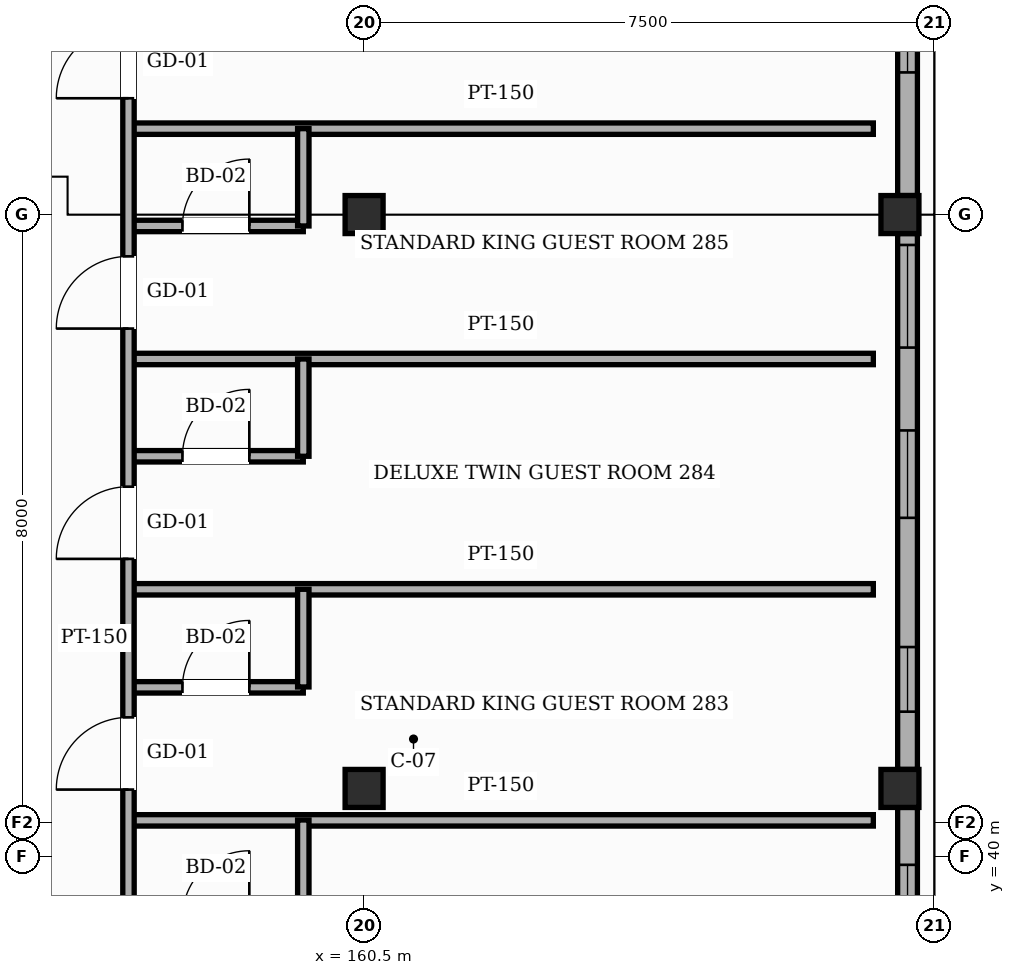
"""IFC4 building model, lengths in metres.
Left out: names, types, materials, properties, quantities, classifications, styles, units other than length and angle.
Written with IfcOpenShell. Run it as: python <this file> out.ifc"""

import sys

from ifc_helpers import new_model, si_unit, direction, frame, frame_2d, origin, origin_2d, place, context, subcontext, project, spatial, rectangle, hollow_rectangle, extrude, element, fill, save


model = new_model("IFC4")
c1 = context("Model", 3, precision=1e-05, world=origin(), true_north=direction((0.0, 1.0)))
c2 = subcontext(c1, "Body", "Model", "MODEL_VIEW")
j1 = project(units=[si_unit("LENGTHUNIT", "METRE"), si_unit("PLANEANGLEUNIT", "RADIAN")], contexts=[c1])
p1 = place(None, origin())
s1 = spatial("IfcSite", under=j1, at=p1, CompositionType="ELEMENT")
p2 = place(p1, origin())
s2 = spatial("IfcBuilding", under=s1, at=p2, CompositionType="ELEMENT")
p3 = place(p2, frame((0.0, 0.0, 39.0)))
s3 = spatial("IfcBuildingStorey", under=s2, at=p3, CompositionType="ELEMENT", Elevation=39.0)
for number, where, z_axis, x_axis in (
    (1, (160.5, 40.9, 0.0), (0.0, 0.0, 1.0), (1.0, 0.0, 0.0)),
    (2, (160.5, 48.45, 0.0), (0.0, 0.0, 1.0), (1.0, 0.0, 0.0)),
    (3, (167.55, 40.9, 0.0), (0.0, 0.0, 1.0), (1.0, 0.0, 0.0)),
    (4, (167.55, 48.45, 0.0), (0.0, 0.0, 1.0), (1.0, 0.0, 0.0)),
):
    element("IfcColumn", number, at=place(p3, frame(where, z_axis=z_axis, x_axis=x_axis)), inside=s3, PredefinedType="COLUMN", context=c2, shape_type="SweptSolid", body=[
        extrude(hollow_rectangle(XDim=0.5, YDim=0.5, WallThickness=0.022, InnerFilletRadius=0.022, OuterFilletRadius=0.044, at=origin_2d()), origin(), (0.0, 0.0, 1.0), 3.6),
    ])
p4 = place(p3, frame((167.65, 40.65, 0.0), z_axis=(0.0, 0.0, 1.0), x_axis=(0.0, -1.0, 0.0)))
e5 = element("IfcWall", 5, at=p4, inside=s3, PredefinedType="SOLIDWALL", context=c2, shape_type="SweptSolid", body=[
    extrude(rectangle(XDim=8.4, YDim=0.26, at=frame_2d((4.2, 0.0))), origin(), (0.0, 0.0, 1.0), 2.755),
])
p5 = place(p4, frame((6.59, 0.0, 0.85)))
e6 = element("IfcOpeningElement", 6, at=p5, cuts=e5, PredefinedType="OPENING", context=c2, shape_type="SweptSolid", body=[
    extrude(rectangle(XDim=1.45, YDim=1.35, at=frame_2d((0.725, 0.675))), frame((0.0, 0.14, 0.0), z_axis=(0.0, -1.0, 0.0), x_axis=(1.0, 0.0, 0.0)), (0.0, 0.0, 1.0), 0.28),
])
p6 = place(p4, frame((3.885, 0.0, 0.85)))
e7 = element("IfcOpeningElement", 7, at=p6, cuts=e5, PredefinedType="OPENING", context=c2, shape_type="SweptSolid", body=[
    extrude(rectangle(XDim=1.65, YDim=1.35, at=frame_2d((0.825, 0.675))), frame((0.0, 0.14, 0.0), z_axis=(0.0, -1.0, 0.0), x_axis=(1.0, 0.0, 0.0)), (0.0, 0.0, 1.0), 0.28),
])
p7 = place(p4, frame((0.755, 0.0, 0.85)))
e8 = element("IfcOpeningElement", 8, at=p7, cuts=e5, PredefinedType="OPENING", context=c2, shape_type="SweptSolid", body=[
    extrude(rectangle(XDim=1.85, YDim=1.35, at=frame_2d((0.925, 0.675))), frame((0.0, 0.14, 0.0), z_axis=(0.0, -1.0, 0.0), x_axis=(1.0, 0.0, 0.0)), (0.0, 0.0, 1.0), 0.28),
])
p8 = place(p3, frame((167.65, 48.2, 0.0), z_axis=(0.0, 0.0, 1.0), x_axis=(0.0, -1.0, 0.0)))
e9 = element("IfcWall", 9, at=p8, inside=s3, PredefinedType="SOLIDWALL", context=c2, shape_type="SweptSolid", body=[
    extrude(rectangle(XDim=7.05, YDim=0.26, at=frame_2d((3.525, 0.0))), origin(), (0.0, 0.0, 1.0), 2.755),
])
p9 = place(p8, frame((5.44, 0.0, 0.85)))
e10 = element("IfcOpeningElement", 10, at=p9, cuts=e9, PredefinedType="OPENING", context=c2, shape_type="SweptSolid", body=[
    extrude(rectangle(XDim=0.85, YDim=1.35, at=frame_2d((0.425, 0.675))), frame((0.0, 0.14, 0.0), z_axis=(0.0, -1.0, 0.0), x_axis=(1.0, 0.0, 0.0)), (0.0, 0.0, 1.0), 0.28),
])
p10 = place(p8, frame((2.59, 0.0, 0.85)))
e11 = element("IfcOpeningElement", 11, at=p10, cuts=e9, PredefinedType="OPENING", context=c2, shape_type="SweptSolid", body=[
    extrude(rectangle(XDim=1.15, YDim=1.35, at=frame_2d((0.575, 0.675))), frame((0.0, 0.14, 0.0), z_axis=(0.0, -1.0, 0.0), x_axis=(1.0, 0.0, 0.0)), (0.0, 0.0, 1.0), 0.28),
])
p11 = place(p8, frame((0.15, 0.0, 0.85)))
e12 = element("IfcOpeningElement", 12, at=p11, cuts=e9, PredefinedType="OPENING", context=c2, shape_type="SweptSolid", body=[
    extrude(rectangle(XDim=1.35, YDim=1.35, at=frame_2d((0.675, 0.675))), frame((0.0, 0.14, 0.0), z_axis=(0.0, -1.0, 0.0), x_axis=(1.0, 0.0, 0.0)), (0.0, 0.0, 1.0), 0.28),
])
p12 = place(p3, frame((167.65, 56.2, 0.0), z_axis=(0.0, 0.0, 1.0), x_axis=(0.0, -1.0, 0.0)))
e13 = element("IfcWall", 13, at=p12, inside=s3, PredefinedType="SOLIDWALL", context=c2, shape_type="SweptSolid", body=[
    extrude(rectangle(XDim=7.5, YDim=0.26, at=frame_2d((3.75, 0.0))), origin(), (0.0, 0.0, 1.0), 2.755),
])
p13 = place(p12, frame((4.33, 0.0, 0.85)))
e14 = element("IfcOpeningElement", 14, at=p13, cuts=e13, PredefinedType="OPENING", context=c2, shape_type="SweptSolid", body=[
    extrude(rectangle(XDim=1.55, YDim=1.35, at=frame_2d((0.775, 0.675))), frame((0.0, 0.14, 0.0), z_axis=(0.0, -1.0, 0.0), x_axis=(1.0, 0.0, 0.0)), (0.0, 0.0, 1.0), 0.28),
])
p14 = place(p12, frame((1.2, 0.0, 0.85)))
e15 = element("IfcOpeningElement", 15, at=p14, cuts=e13, PredefinedType="OPENING", context=c2, shape_type="SweptSolid", body=[
    extrude(rectangle(XDim=1.75, YDim=1.35, at=frame_2d((0.875, 0.675))), frame((0.0, 0.14, 0.0), z_axis=(0.0, -1.0, 0.0), x_axis=(1.0, 0.0, 0.0)), (0.0, 0.0, 1.0), 0.28),
])
p15 = place(p3, frame((157.4, 40.48, 0.0), z_axis=(0.0, 0.0, 1.0), x_axis=(1.0, 0.0, 0.0)))
e16 = element("IfcWall", 16, at=p15, inside=s3, PredefinedType="PARTITIONING", context=c2, shape_type="SweptSolid", body=[
    extrude(rectangle(XDim=9.8, YDim=0.15, at=frame_2d((4.9, 0.0))), origin(), (0.0, 0.0, 1.0), 3.365),
])
p16 = place(p3, frame((157.4, 42.23, 0.0), z_axis=(0.0, 0.0, 1.0), x_axis=(1.0, 0.0, 0.0)))
e17 = element("IfcWall", 17, at=p16, inside=s3, PredefinedType="PARTITIONING", context=c2, shape_type="SweptSolid", body=[
    extrude(rectangle(XDim=2.3, YDim=0.15, at=frame_2d((1.15, 0.0))), origin(), (0.0, 0.0, 1.0), 3.365),
])
p17 = place(p16, frame((0.71, 0.0, 0.0)))
e18 = element("IfcOpeningElement", 18, at=p17, cuts=e17, PredefinedType="OPENING", context=c2, shape_type="SweptSolid", body=[
    extrude(rectangle(XDim=0.88, YDim=2.12, at=frame_2d((0.44, 1.06))), frame((0.0, 0.085, 0.0), z_axis=(0.0, -1.0, 0.0), x_axis=(1.0, 0.0, 0.0)), (0.0, 0.0, 1.0), 0.17),
])
p18 = place(p3, frame((157.4, 43.52, 0.0), z_axis=(0.0, 0.0, 1.0), x_axis=(1.0, 0.0, 0.0)))
e19 = element("IfcWall", 19, at=p18, inside=s3, PredefinedType="PARTITIONING", context=c2, shape_type="SweptSolid", body=[
    extrude(rectangle(XDim=9.8, YDim=0.15, at=frame_2d((4.9, 0.0))), origin(), (0.0, 0.0, 1.0), 3.365),
])
p19 = place(p3, frame((157.4, 45.27, 0.0), z_axis=(0.0, 0.0, 1.0), x_axis=(1.0, 0.0, 0.0)))
e20 = element("IfcWall", 20, at=p19, inside=s3, PredefinedType="PARTITIONING", context=c2, shape_type="SweptSolid", body=[
    extrude(rectangle(XDim=2.3, YDim=0.15, at=frame_2d((1.15, 0.0))), origin(), (0.0, 0.0, 1.0), 3.365),
])
p20 = place(p19, frame((0.71, 0.0, 0.0)))
e21 = element("IfcOpeningElement", 21, at=p20, cuts=e20, PredefinedType="OPENING", context=c2, shape_type="SweptSolid", body=[
    extrude(rectangle(XDim=0.88, YDim=2.12, at=frame_2d((0.44, 1.06))), frame((0.0, 0.085, 0.0), z_axis=(0.0, -1.0, 0.0), x_axis=(1.0, 0.0, 0.0)), (0.0, 0.0, 1.0), 0.17),
])
p21 = place(p3, frame((157.4, 46.55, 0.0), z_axis=(0.0, 0.0, 1.0), x_axis=(1.0, 0.0, 0.0)))
e22 = element("IfcWall", 22, at=p21, inside=s3, PredefinedType="PARTITIONING", context=c2, shape_type="SweptSolid", body=[
    extrude(rectangle(XDim=9.8, YDim=0.15, at=frame_2d((4.9, 0.0))), origin(), (0.0, 0.0, 1.0), 3.365),
])
p22 = place(p3, frame((157.4, 48.3, 0.0), z_axis=(0.0, 0.0, 1.0), x_axis=(1.0, 0.0, 0.0)))
e23 = element("IfcWall", 23, at=p22, inside=s3, PredefinedType="PARTITIONING", context=c2, shape_type="SweptSolid", body=[
    extrude(rectangle(XDim=2.3, YDim=0.15, at=frame_2d((1.15, 0.0))), origin(), (0.0, 0.0, 1.0), 3.365),
])
p23 = place(p22, frame((0.71, 0.0, 0.0)))
e24 = element("IfcOpeningElement", 24, at=p23, cuts=e23, PredefinedType="OPENING", context=c2, shape_type="SweptSolid", body=[
    extrude(rectangle(XDim=0.88, YDim=2.12, at=frame_2d((0.44, 1.06))), frame((0.0, 0.085, 0.0), z_axis=(0.0, -1.0, 0.0), x_axis=(1.0, 0.0, 0.0)), (0.0, 0.0, 1.0), 0.17),
])
p24 = place(p3, frame((157.4, 49.58, 0.0), z_axis=(0.0, 0.0, 1.0), x_axis=(1.0, 0.0, 0.0)))
e25 = element("IfcWall", 25, at=p24, inside=s3, PredefinedType="PARTITIONING", context=c2, shape_type="SweptSolid", body=[
    extrude(rectangle(XDim=9.8, YDim=0.15, at=frame_2d((4.9, 0.0))), origin(), (0.0, 0.0, 1.0), 3.365),
])
p25 = place(p3, frame((157.4, 22.3, 0.0), z_axis=(0.0, 0.0, 1.0), x_axis=(0.0, 1.0, 0.0)))
e26 = element("IfcWall", 26, at=p25, inside=s3, PredefinedType="PARTITIONING", context=c2, shape_type="SweptSolid", body=[
    extrude(rectangle(XDim=48.5, YDim=0.15, at=frame_2d((24.25, 0.0))), origin(), (0.0, 0.0, 1.0), 3.365),
])
p26 = place(p25, frame((0.325, 0.0, 0.0)))
e27 = element("IfcOpeningElement", 27, at=p26, cuts=e26, PredefinedType="OPENING", context=c2, shape_type="SweptSolid", body=[
    extrude(rectangle(XDim=1.1, YDim=2.2, at=frame_2d((0.55, 1.1))), frame((0.0, 0.085, 0.0), z_axis=(0.0, -1.0, 0.0), x_axis=(1.0, 0.0, 0.0)), (0.0, 0.0, 1.0), 0.17),
])
p27 = place(p25, frame((3.43, 0.0, 0.0)))
e28 = element("IfcOpeningElement", 28, at=p27, cuts=e26, PredefinedType="OPENING", context=c2, shape_type="SweptSolid", body=[
    extrude(rectangle(XDim=0.95, YDim=2.15, at=frame_2d((0.475, 1.075))), frame((0.0, 0.085, 0.0), z_axis=(0.0, -1.0, 0.0), x_axis=(1.0, 0.0, 0.0)), (0.0, 0.0, 1.0), 0.17),
])
p28 = place(p25, frame((6.46, 0.0, 0.0)))
e29 = element("IfcOpeningElement", 29, at=p28, cuts=e26, PredefinedType="OPENING", context=c2, shape_type="SweptSolid", body=[
    extrude(rectangle(XDim=0.95, YDim=2.15, at=frame_2d((0.475, 1.075))), frame((0.0, 0.085, 0.0), z_axis=(0.0, -1.0, 0.0), x_axis=(1.0, 0.0, 0.0)), (0.0, 0.0, 1.0), 0.17),
])
p29 = place(p25, frame((9.495, 0.0, 0.0)))
e30 = element("IfcOpeningElement", 30, at=p29, cuts=e26, PredefinedType="OPENING", context=c2, shape_type="SweptSolid", body=[
    extrude(rectangle(XDim=0.95, YDim=2.15, at=frame_2d((0.475, 1.075))), frame((0.0, 0.085, 0.0), z_axis=(0.0, -1.0, 0.0), x_axis=(1.0, 0.0, 0.0)), (0.0, 0.0, 1.0), 0.17),
])
p30 = place(p25, frame((12.525, 0.0, 0.0)))
e31 = element("IfcOpeningElement", 31, at=p30, cuts=e26, PredefinedType="OPENING", context=c2, shape_type="SweptSolid", body=[
    extrude(rectangle(XDim=0.95, YDim=2.15, at=frame_2d((0.475, 1.075))), frame((0.0, 0.085, 0.0), z_axis=(0.0, -1.0, 0.0), x_axis=(1.0, 0.0, 0.0)), (0.0, 0.0, 1.0), 0.17),
])
p31 = place(p25, frame((15.555, 0.0, 0.0)))
e32 = element("IfcOpeningElement", 32, at=p31, cuts=e26, PredefinedType="OPENING", context=c2, shape_type="SweptSolid", body=[
    extrude(rectangle(XDim=0.95, YDim=2.15, at=frame_2d((0.475, 1.075))), frame((0.0, 0.085, 0.0), z_axis=(0.0, -1.0, 0.0), x_axis=(1.0, 0.0, 0.0)), (0.0, 0.0, 1.0), 0.17),
])
p32 = place(p25, frame((18.585, 0.0, 0.0)))
e33 = element("IfcOpeningElement", 33, at=p32, cuts=e26, PredefinedType="OPENING", context=c2, shape_type="SweptSolid", body=[
    extrude(rectangle(XDim=0.95, YDim=2.15, at=frame_2d((0.475, 1.075))), frame((0.0, 0.085, 0.0), z_axis=(0.0, -1.0, 0.0), x_axis=(1.0, 0.0, 0.0)), (0.0, 0.0, 1.0), 0.17),
])
p33 = place(p25, frame((21.62, 0.0, 0.0)))
e34 = element("IfcOpeningElement", 34, at=p33, cuts=e26, PredefinedType="OPENING", context=c2, shape_type="SweptSolid", body=[
    extrude(rectangle(XDim=0.95, YDim=2.15, at=frame_2d((0.475, 1.075))), frame((0.0, 0.085, 0.0), z_axis=(0.0, -1.0, 0.0), x_axis=(1.0, 0.0, 0.0)), (0.0, 0.0, 1.0), 0.17),
])
p34 = place(p25, frame((24.65, 0.0, 0.0)))
e35 = element("IfcOpeningElement", 35, at=p34, cuts=e26, PredefinedType="OPENING", context=c2, shape_type="SweptSolid", body=[
    extrude(rectangle(XDim=0.95, YDim=2.15, at=frame_2d((0.475, 1.075))), frame((0.0, 0.085, 0.0), z_axis=(0.0, -1.0, 0.0), x_axis=(1.0, 0.0, 0.0)), (0.0, 0.0, 1.0), 0.17),
])
p35 = place(p25, frame((27.68, 0.0, 0.0)))
e36 = element("IfcOpeningElement", 36, at=p35, cuts=e26, PredefinedType="OPENING", context=c2, shape_type="SweptSolid", body=[
    extrude(rectangle(XDim=0.95, YDim=2.15, at=frame_2d((0.475, 1.075))), frame((0.0, 0.085, 0.0), z_axis=(0.0, -1.0, 0.0), x_axis=(1.0, 0.0, 0.0)), (0.0, 0.0, 1.0), 0.17),
])
p36 = place(p25, frame((30.71, 0.0, 0.0)))
e37 = element("IfcOpeningElement", 37, at=p36, cuts=e26, PredefinedType="OPENING", context=c2, shape_type="SweptSolid", body=[
    extrude(rectangle(XDim=0.95, YDim=2.15, at=frame_2d((0.475, 1.075))), frame((0.0, 0.085, 0.0), z_axis=(0.0, -1.0, 0.0), x_axis=(1.0, 0.0, 0.0)), (0.0, 0.0, 1.0), 0.17),
])
p37 = place(p25, frame((33.745, 0.0, 0.0)))
e38 = element("IfcOpeningElement", 38, at=p37, cuts=e26, PredefinedType="OPENING", context=c2, shape_type="SweptSolid", body=[
    extrude(rectangle(XDim=0.95, YDim=2.15, at=frame_2d((0.475, 1.075))), frame((0.0, 0.085, 0.0), z_axis=(0.0, -1.0, 0.0), x_axis=(1.0, 0.0, 0.0)), (0.0, 0.0, 1.0), 0.17),
])
p38 = place(p25, frame((36.775, 0.0, 0.0)))
e39 = element("IfcOpeningElement", 39, at=p38, cuts=e26, PredefinedType="OPENING", context=c2, shape_type="SweptSolid", body=[
    extrude(rectangle(XDim=0.95, YDim=2.15, at=frame_2d((0.475, 1.075))), frame((0.0, 0.085, 0.0), z_axis=(0.0, -1.0, 0.0), x_axis=(1.0, 0.0, 0.0)), (0.0, 0.0, 1.0), 0.17),
])
p39 = place(p25, frame((39.805, 0.0, 0.0)))
e40 = element("IfcOpeningElement", 40, at=p39, cuts=e26, PredefinedType="OPENING", context=c2, shape_type="SweptSolid", body=[
    extrude(rectangle(XDim=0.95, YDim=2.15, at=frame_2d((0.475, 1.075))), frame((0.0, 0.085, 0.0), z_axis=(0.0, -1.0, 0.0), x_axis=(1.0, 0.0, 0.0)), (0.0, 0.0, 1.0), 0.17),
])
p40 = place(p25, frame((42.84, 0.0, 0.0)))
e41 = element("IfcOpeningElement", 41, at=p40, cuts=e26, PredefinedType="OPENING", context=c2, shape_type="SweptSolid", body=[
    extrude(rectangle(XDim=0.95, YDim=2.15, at=frame_2d((0.475, 1.075))), frame((0.0, 0.085, 0.0), z_axis=(0.0, -1.0, 0.0), x_axis=(1.0, 0.0, 0.0)), (0.0, 0.0, 1.0), 0.17),
])
p41 = place(p25, frame((45.87, 0.0, 0.0)))
e42 = element("IfcOpeningElement", 42, at=p41, cuts=e26, PredefinedType="OPENING", context=c2, shape_type="SweptSolid", body=[
    extrude(rectangle(XDim=0.95, YDim=2.15, at=frame_2d((0.475, 1.075))), frame((0.0, 0.085, 0.0), z_axis=(0.0, -1.0, 0.0), x_axis=(1.0, 0.0, 0.0)), (0.0, 0.0, 1.0), 0.17),
])
p42 = place(p3, frame((159.7, 39.205, 0.0), z_axis=(0.0, 0.0, 1.0), x_axis=(0.0, 1.0, 0.0)))
e43 = element("IfcWall", 43, at=p42, inside=s3, PredefinedType="PARTITIONING", context=c2, shape_type="SweptSolid", body=[
    extrude(rectangle(XDim=1.28, YDim=0.15, at=frame_2d((0.64, 0.0))), origin(), (0.0, 0.0, 1.0), 3.365),
])
p43 = place(p3, frame((159.7, 42.235, 0.0), z_axis=(0.0, 0.0, 1.0), x_axis=(0.0, 1.0, 0.0)))
e44 = element("IfcWall", 44, at=p43, inside=s3, PredefinedType="PARTITIONING", context=c2, shape_type="SweptSolid", body=[
    extrude(rectangle(XDim=1.285, YDim=0.15, at=frame_2d((0.643, 0.0))), origin(), (0.0, 0.0, 1.0), 3.365),
])
for number, where, z_axis, x_axis in (
    (45, (159.7, 45.27, 0.0), (0.0, 0.0, 1.0), (0.0, 1.0, 0.0)),
    (46, (159.7, 48.3, 0.0), (0.0, 0.0, 1.0), (0.0, 1.0, 0.0)),
):
    element("IfcWall", number, at=place(p3, frame(where, z_axis=z_axis, x_axis=x_axis)), inside=s3, PredefinedType="PARTITIONING", context=c2, shape_type="SweptSolid", body=[
        extrude(rectangle(XDim=1.28, YDim=0.15, at=frame_2d((0.64, 0.0))), origin(), (0.0, 0.0, 1.0), 3.365),
    ])
p44 = place(p7, origin())
e47 = element("IfcWindow", 47, at=p44, inside=s3, PartitioningType="SINGLE_PANEL", PredefinedType="WINDOW", context=c2, shape_type="SweptSolid", body=[
    extrude(rectangle(XDim=1.85, YDim=1.35, at=frame_2d((0.925, 0.675))), frame((0.0, 0.03, 0.0), z_axis=(0.0, -1.0, 0.0), x_axis=(1.0, 0.0, 0.0)), (0.0, 0.0, 1.0), 0.06),
])
fill(e8, e47)
p45 = place(p9, origin())
e48 = element("IfcWindow", 48, at=p45, inside=s3, PartitioningType="SINGLE_PANEL", PredefinedType="WINDOW", context=c2, shape_type="SweptSolid", body=[
    extrude(rectangle(XDim=0.85, YDim=1.35, at=frame_2d((0.425, 0.675))), frame((0.0, 0.03, 0.0), z_axis=(0.0, -1.0, 0.0), x_axis=(1.0, 0.0, 0.0)), (0.0, 0.0, 1.0), 0.06),
])
fill(e10, e48)
p46 = place(p10, origin())
e49 = element("IfcWindow", 49, at=p46, inside=s3, PartitioningType="SINGLE_PANEL", PredefinedType="WINDOW", context=c2, shape_type="SweptSolid", body=[
    extrude(rectangle(XDim=1.15, YDim=1.35, at=frame_2d((0.575, 0.675))), frame((0.0, 0.03, 0.0), z_axis=(0.0, -1.0, 0.0), x_axis=(1.0, 0.0, 0.0)), (0.0, 0.0, 1.0), 0.06),
])
fill(e11, e49)
p47 = place(p11, origin())
e50 = element("IfcWindow", 50, at=p47, inside=s3, PartitioningType="SINGLE_PANEL", PredefinedType="WINDOW", context=c2, shape_type="SweptSolid", body=[
    extrude(rectangle(XDim=1.35, YDim=1.35, at=frame_2d((0.675, 0.675))), frame((0.0, 0.03, 0.0), z_axis=(0.0, -1.0, 0.0), x_axis=(1.0, 0.0, 0.0)), (0.0, 0.0, 1.0), 0.06),
])
fill(e12, e50)
p48 = place(p13, origin())
e51 = element("IfcWindow", 51, at=p48, inside=s3, PartitioningType="SINGLE_PANEL", PredefinedType="WINDOW", context=c2, shape_type="SweptSolid", body=[
    extrude(rectangle(XDim=1.55, YDim=1.35, at=frame_2d((0.775, 0.675))), frame((0.0, 0.03, 0.0), z_axis=(0.0, -1.0, 0.0), x_axis=(1.0, 0.0, 0.0)), (0.0, 0.0, 1.0), 0.06),
])
fill(e14, e51)
p49 = place(p32, origin())
e52 = element("IfcDoor", 52, at=p49, inside=s3, OperationType="SINGLE_SWING_LEFT", PredefinedType="DOOR", context=c2, shape_type="SweptSolid", body=[
    extrude(rectangle(XDim=0.95, YDim=2.15, at=frame_2d((0.475, 1.075))), frame((0.0, 0.025, 0.0), z_axis=(0.0, -1.0, 0.0), x_axis=(1.0, 0.0, 0.0)), (0.0, 0.0, 1.0), 0.05),
])
fill(e33, e52)
p50 = place(p17, origin())
e53 = element("IfcDoor", 53, at=p50, inside=s3, OperationType="SINGLE_SWING_RIGHT", PredefinedType="DOOR", context=c2, shape_type="SweptSolid", body=[
    extrude(rectangle(XDim=0.88, YDim=2.12, at=frame_2d((0.44, 1.06))), frame((0.0, 0.025, 0.0), z_axis=(0.0, -1.0, 0.0), x_axis=(1.0, 0.0, 0.0)), (0.0, 0.0, 1.0), 0.05),
])
fill(e18, e53)
p51 = place(p33, origin())
e54 = element("IfcDoor", 54, at=p51, inside=s3, OperationType="SINGLE_SWING_LEFT", PredefinedType="DOOR", context=c2, shape_type="SweptSolid", body=[
    extrude(rectangle(XDim=0.95, YDim=2.15, at=frame_2d((0.475, 1.075))), frame((0.0, 0.025, 0.0), z_axis=(0.0, -1.0, 0.0), x_axis=(1.0, 0.0, 0.0)), (0.0, 0.0, 1.0), 0.05),
])
fill(e34, e54)
p52 = place(p20, origin())
e55 = element("IfcDoor", 55, at=p52, inside=s3, OperationType="SINGLE_SWING_RIGHT", PredefinedType="DOOR", context=c2, shape_type="SweptSolid", body=[
    extrude(rectangle(XDim=0.88, YDim=2.12, at=frame_2d((0.44, 1.06))), frame((0.0, 0.025, 0.0), z_axis=(0.0, -1.0, 0.0), x_axis=(1.0, 0.0, 0.0)), (0.0, 0.0, 1.0), 0.05),
])
fill(e21, e55)
p53 = place(p34, origin())
e56 = element("IfcDoor", 56, at=p53, inside=s3, OperationType="SINGLE_SWING_LEFT", PredefinedType="DOOR", context=c2, shape_type="SweptSolid", body=[
    extrude(rectangle(XDim=0.95, YDim=2.15, at=frame_2d((0.475, 1.075))), frame((0.0, 0.025, 0.0), z_axis=(0.0, -1.0, 0.0), x_axis=(1.0, 0.0, 0.0)), (0.0, 0.0, 1.0), 0.05),
])
fill(e35, e56)
p54 = place(p23, origin())
e57 = element("IfcDoor", 57, at=p54, inside=s3, OperationType="SINGLE_SWING_RIGHT", PredefinedType="DOOR", context=c2, shape_type="SweptSolid", body=[
    extrude(rectangle(XDim=0.88, YDim=2.12, at=frame_2d((0.44, 1.06))), frame((0.0, 0.025, 0.0), z_axis=(0.0, -1.0, 0.0), x_axis=(1.0, 0.0, 0.0)), (0.0, 0.0, 1.0), 0.05),
])
fill(e24, e57)
p55 = place(p35, origin())
e58 = element("IfcDoor", 58, at=p55, inside=s3, OperationType="SINGLE_SWING_LEFT", PredefinedType="DOOR", context=c2, shape_type="SweptSolid", body=[
    extrude(rectangle(XDim=0.95, YDim=2.15, at=frame_2d((0.475, 1.075))), frame((0.0, 0.025, 0.0), z_axis=(0.0, -1.0, 0.0), x_axis=(1.0, 0.0, 0.0)), (0.0, 0.0, 1.0), 0.05),
])
fill(e36, e58)
save(model, sys.argv[1])
